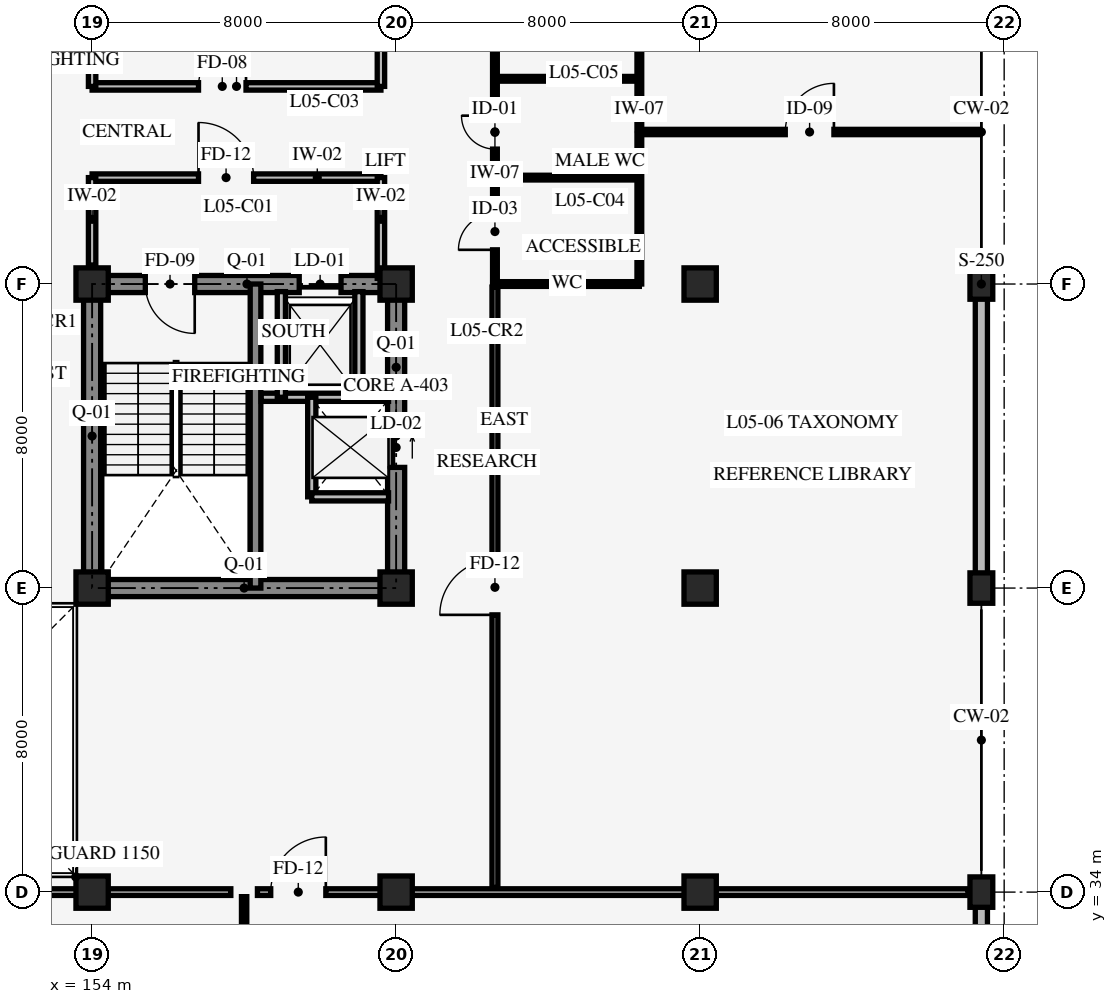
"""IFC4 building model, lengths in metres.
Left out: names, types, materials, properties, quantities, classifications, styles, units other than length and angle.
Written with IfcOpenShell. Run it as: python <this file> out.ifc"""

import sys

from ifc_helpers import new_model, si_unit, direction, frame, frame_2d, origin, origin_2d, place, context, subcontext, project, spatial, rectangle, extrude, element, fill, save


model = new_model("IFC4")
c1 = context("Model", 3, precision=1e-05, world=origin(), true_north=direction((0.0, 1.0)))
c2 = subcontext(c1, "Body", "Model", "MODEL_VIEW")
j1 = project(units=[si_unit("LENGTHUNIT", "METRE"), si_unit("PLANEANGLEUNIT", "RADIAN")], contexts=[c1])
p1 = place(None, origin())
s1 = spatial("IfcSite", under=j1, at=p1, CompositionType="ELEMENT")
p2 = place(p1, origin())
s2 = spatial("IfcBuilding", under=s1, at=p2, CompositionType="ELEMENT")
p3 = place(p2, frame((0.0, 0.0, 19.2)))
s3 = spatial("IfcBuildingStorey", under=s2, at=p3, CompositionType="ELEMENT", Elevation=19.2)
p4 = place(p3, frame((154.0, 42.0, 0.0), z_axis=(0.0, 0.0, 1.0), x_axis=(1.0, 0.0, 0.0)))
e1 = element("IfcWall", 1, at=p4, inside=s3, PredefinedType="SHEAR", context=c2, shape_type="SweptSolid", body=[
    extrude(rectangle(XDim=8.0, YDim=0.45, at=frame_2d((4.0, 0.0))), origin(), (0.0, 0.0, 1.0), 3.95),
])
p5 = place(p3, frame((162.0, 42.0, 0.0), z_axis=(0.0, 0.0, 1.0), x_axis=(0.0, 1.0, 0.0)))
e2 = element("IfcWall", 2, at=p5, inside=s3, PredefinedType="SHEAR", context=c2, shape_type="SweptSolid", body=[
    extrude(rectangle(XDim=8.0, YDim=0.45, at=frame_2d((4.0, 0.0))), origin(), (0.0, 0.0, 1.0), 3.95),
])
p6 = place(p5, frame((3.175, 0.0, 0.0)))
e3 = element("IfcOpeningElement", 3, at=p6, cuts=e2, PredefinedType="OPENING", context=c2, shape_type="SweptSolid", body=[
    extrude(rectangle(XDim=1.05, YDim=2.2, at=frame_2d((0.525, 1.1))), frame((0.0, 0.235, 0.0), z_axis=(0.0, -1.0, 0.0), x_axis=(1.0, 0.0, 0.0)), (0.0, 0.0, 1.0), 0.47),
])
p7 = place(p3, frame((162.0, 50.0, 0.0), z_axis=(0.0, 0.0, 1.0), x_axis=(-1.0, 0.0, 0.0)))
e4 = element("IfcWall", 4, at=p7, inside=s3, PredefinedType="SHEAR", context=c2, shape_type="SweptSolid", body=[
    extrude(rectangle(XDim=8.0, YDim=0.45, at=frame_2d((4.0, 0.0))), origin(), (0.0, 0.0, 1.0), 3.95),
])
p8 = place(p7, frame((5.3, 0.0, 0.0)))
e5 = element("IfcOpeningElement", 5, at=p8, cuts=e4, PredefinedType="OPENING", context=c2, shape_type="SweptSolid", body=[
    extrude(rectangle(XDim=1.3, YDim=2.15, at=frame_2d((0.65, 1.075))), frame((0.0, 0.235, 0.0), z_axis=(0.0, -1.0, 0.0), x_axis=(1.0, 0.0, 0.0)), (0.0, 0.0, 1.0), 0.47),
])
p9 = place(p7, frame((1.45, 0.0, 0.0)))
e6 = element("IfcOpeningElement", 6, at=p9, cuts=e4, PredefinedType="OPENING", context=c2, shape_type="SweptSolid", body=[
    extrude(rectangle(XDim=1.1, YDim=2.2, at=frame_2d((0.55, 1.1))), frame((0.0, 0.235, 0.0), z_axis=(0.0, -1.0, 0.0), x_axis=(1.0, 0.0, 0.0)), (0.0, 0.0, 1.0), 0.47),
])
p10 = place(p3, frame((154.0, 50.0, 0.0), z_axis=(0.0, 0.0, 1.0), x_axis=(0.0, -1.0, 0.0)))
e7 = element("IfcWall", 7, at=p10, inside=s3, PredefinedType="SHEAR", context=c2, shape_type="SweptSolid", body=[
    extrude(rectangle(XDim=8.0, YDim=0.45, at=frame_2d((4.0, 0.0))), origin(), (0.0, 0.0, 1.0), 3.95),
])
p11 = place(p3, frame((158.3, 42.0, 0.0), z_axis=(0.0, 0.0, 1.0), x_axis=(0.0, 1.0, 0.0)))
e8 = element("IfcWall", 8, at=p11, inside=s3, PredefinedType="SHEAR", context=c2, shape_type="SweptSolid", body=[
    extrude(rectangle(XDim=8.0, YDim=0.28, at=frame_2d((4.0, 0.0))), origin(), (0.0, 0.0, 1.0), 3.95),
])
for number, where, z_axis, x_axis in (
    (9, (154.0, 34.0, 0.0), (0.0, 0.0, 1.0), (1.0, 0.0, 0.0)),
    (10, (154.0, 42.0, 0.0), (0.0, 0.0, 1.0), (1.0, 0.0, 0.0)),
    (11, (154.0, 50.0, 0.0), (0.0, 0.0, 1.0), (1.0, 0.0, 0.0)),
    (12, (162.0, 34.0, 0.0), (0.0, 0.0, 1.0), (1.0, 0.0, 0.0)),
    (13, (162.0, 42.0, 0.0), (0.0, 0.0, 1.0), (1.0, 0.0, 0.0)),
    (14, (162.0, 50.0, 0.0), (0.0, 0.0, 1.0), (1.0, 0.0, 0.0)),
    (15, (170.0, 34.0, 0.0), (0.0, 0.0, 1.0), (1.0, 0.0, 0.0)),
    (16, (170.0, 42.0, 0.0), (0.0, 0.0, 1.0), (1.0, 0.0, 0.0)),
    (17, (170.0, 50.0, 0.0), (0.0, 0.0, 1.0), (1.0, 0.0, 0.0)),
):
    element("IfcColumn", number, at=place(p3, frame(where, z_axis=z_axis, x_axis=x_axis)), inside=s3, PredefinedType="COLUMN", context=c2, shape_type="SweptSolid", body=[
        extrude(rectangle(XDim=0.85, YDim=0.85, at=origin_2d()), origin(), (0.0, 0.0, 1.0), 4.2),
    ])
for number, where, z_axis, x_axis in (
    (18, (177.4, 34.0, 0.0), (0.0, 0.0, 1.0), (1.0, 0.0, 0.0)),
    (19, (177.4, 42.0, 0.0), (0.0, 0.0, 1.0), (1.0, 0.0, 0.0)),
    (20, (177.4, 50.0, 0.0), (0.0, 0.0, 1.0), (1.0, 0.0, 0.0)),
):
    element("IfcColumn", number, at=place(p3, frame(where, z_axis=z_axis, x_axis=x_axis)), inside=s3, PredefinedType="COLUMN", context=c2, shape_type="SweptSolid", body=[
        extrude(rectangle(XDim=0.6, YDim=0.8, at=origin_2d()), origin(), (0.0, 0.0, 1.0), 4.2),
    ])
p12 = place(p3, frame((177.4, 50.0, 0.0), z_axis=(0.0, 0.0, 1.0), x_axis=(0.0, -1.0, 0.0)))
e21 = element("IfcWall", 21, at=p12, inside=s3, PredefinedType="STANDARD", context=c2, shape_type="SweptSolid", body=[
    extrude(rectangle(XDim=8.0, YDim=0.32, at=frame_2d((4.0, 0.0))), origin(), (0.0, 0.0, 1.0), 3.19),
])
p13 = place(p3, frame((177.4, 34.0, 0.0), z_axis=(0.0, 0.0, 1.0), x_axis=(0.0, -1.0, 0.0)))
e22 = element("IfcWall", 22, at=p13, inside=s3, PredefinedType="STANDARD", context=c2, shape_type="SweptSolid", body=[
    extrude(rectangle(XDim=8.0, YDim=0.32, at=frame_2d((4.0, 0.0))), origin(), (0.0, 0.0, 1.0), 3.19),
])
p14 = place(p13, frame((3.0, 0.0, 0.85)))
e23 = element("IfcOpeningElement", 23, at=p14, cuts=e22, PredefinedType="OPENING", context=c2, shape_type="SweptSolid", body=[
    extrude(rectangle(XDim=2.0, YDim=1.5, at=frame_2d((1.0, 0.75))), frame((0.0, 0.17, 0.0), z_axis=(0.0, -1.0, 0.0), x_axis=(1.0, 0.0, 0.0)), (0.0, 0.0, 1.0), 0.34),
])
p15 = place(p3, frame((158.45, 47.02, 0.0), z_axis=(0.0, 0.0, 1.0), x_axis=(1.0, 0.0, 0.0)))
e24 = element("IfcWall", 24, at=p15, inside=s3, PredefinedType="STANDARD", context=c2, shape_type="SweptSolid", body=[
    extrude(rectangle(XDim=3.35, YDim=0.215, at=frame_2d((1.675, 0.0))), origin(), (0.0, 0.0, 1.0), 3.9),
])
for number, where, z_axis, x_axis in (
    (25, (158.98, 47.02, 0.0), (0.0, 0.0, 1.0), (0.0, 1.0, 0.0)),
    (26, (161.02, 47.02, 0.0), (0.0, 0.0, 1.0), (0.0, 1.0, 0.0)),
):
    element("IfcWall", number, at=place(p3, frame(where, z_axis=z_axis, x_axis=x_axis)), inside=s3, PredefinedType="STANDARD", context=c2, shape_type="SweptSolid", body=[
        extrude(rectangle(XDim=2.78, YDim=0.215, at=frame_2d((1.39, 0.0))), origin(), (0.0, 0.0, 1.0), 3.9),
    ])
p16 = place(p3, frame((159.78, 44.4, 0.0), z_axis=(0.0, 0.0, 1.0), x_axis=(0.0, 1.0, 0.0)))
e27 = element("IfcWall", 27, at=p16, inside=s3, PredefinedType="STANDARD", context=c2, shape_type="SweptSolid", body=[
    extrude(rectangle(XDim=2.62, YDim=0.215, at=frame_2d((1.31, 0.0))), origin(), (0.0, 0.0, 1.0), 3.9),
])
p17 = place(p3, frame((159.78, 44.4, 0.0), z_axis=(0.0, 0.0, 1.0), x_axis=(1.0, 0.0, 0.0)))
e28 = element("IfcWall", 28, at=p17, inside=s3, PredefinedType="STANDARD", context=c2, shape_type="SweptSolid", body=[
    extrude(rectangle(XDim=2.02, YDim=0.215, at=frame_2d((1.01, 0.0))), origin(), (0.0, 0.0, 1.0), 3.9),
])
p18 = place(p3, frame((154.0, 52.8, 0.0), z_axis=(0.0, 0.0, 1.0), x_axis=(1.0, 0.0, 0.0)))
e29 = element("IfcWall", 29, at=p18, inside=s3, PredefinedType="STANDARD", context=c2, shape_type="SweptSolid", body=[
    extrude(rectangle(XDim=7.6, YDim=0.195, at=frame_2d((3.8, 0.0))), origin(), (0.0, 0.0, 1.0), 3.9),
])
p19 = place(p18, frame((2.8, 0.0, 0.0)))
e30 = element("IfcOpeningElement", 30, at=p19, cuts=e29, PredefinedType="OPENING", context=c2, shape_type="SweptSolid", body=[
    extrude(rectangle(XDim=1.45, YDim=2.2, at=frame_2d((0.725, 1.1))), frame((0.0, 0.107, 0.0), z_axis=(0.0, -1.0, 0.0), x_axis=(1.0, 0.0, 0.0)), (0.0, 0.0, 1.0), 0.215),
])
p20 = place(p3, frame((161.6, 50.15, 0.0), z_axis=(0.0, 0.0, 1.0), x_axis=(0.0, 1.0, 0.0)))
e31 = element("IfcWall", 31, at=p20, inside=s3, PredefinedType="STANDARD", context=c2, shape_type="SweptSolid", body=[
    extrude(rectangle(XDim=2.65, YDim=0.195, at=frame_2d((1.325, 0.0))), origin(), (0.0, 0.0, 1.0), 3.19),
])
p21 = place(p3, frame((154.0, 50.5, 0.0), z_axis=(0.0, 0.0, 1.0), x_axis=(0.0, 1.0, 0.0)))
e32 = element("IfcWall", 32, at=p21, inside=s3, PredefinedType="STANDARD", context=c2, shape_type="SweptSolid", body=[
    extrude(rectangle(XDim=2.3, YDim=0.195, at=frame_2d((1.15, 0.0))), origin(), (0.0, 0.0, 1.0), 3.19),
])
p22 = place(p3, frame((154.0, 55.2, 0.0), z_axis=(0.0, 0.0, 1.0), x_axis=(1.0, 0.0, 0.0)))
e33 = element("IfcWall", 33, at=p22, inside=s3, PredefinedType="STANDARD", context=c2, shape_type="SweptSolid", body=[
    extrude(rectangle(XDim=7.6, YDim=0.195, at=frame_2d((3.8, 0.0))), origin(), (0.0, 0.0, 1.0), 3.9),
])
p23 = place(p22, frame((2.8, 0.0, 0.0)))
e34 = element("IfcOpeningElement", 34, at=p23, cuts=e33, PredefinedType="OPENING", context=c2, shape_type="SweptSolid", body=[
    extrude(rectangle(XDim=1.25, YDim=2.15, at=frame_2d((0.625, 1.075))), frame((0.0, 0.107, 0.0), z_axis=(0.0, -1.0, 0.0), x_axis=(1.0, 0.0, 0.0)), (0.0, 0.0, 1.0), 0.215),
])
p24 = place(p3, frame((161.6, 55.2, 0.0), z_axis=(0.0, 0.0, 1.0), x_axis=(0.0, 1.0, 0.0)))
e35 = element("IfcWall", 35, at=p24, inside=s3, PredefinedType="STANDARD", context=c2, shape_type="SweptSolid", body=[
    extrude(rectangle(XDim=2.65, YDim=0.195, at=frame_2d((1.325, 0.0))), origin(), (0.0, 0.0, 1.0), 3.19),
])
p25 = place(p3, frame((154.0, 55.2, 0.0), z_axis=(0.0, 0.0, 1.0), x_axis=(0.0, 1.0, 0.0)))
e36 = element("IfcWall", 36, at=p25, inside=s3, PredefinedType="STANDARD", context=c2, shape_type="SweptSolid", body=[
    extrude(rectangle(XDim=2.3, YDim=0.195, at=frame_2d((1.15, 0.0))), origin(), (0.0, 0.0, 1.0), 3.19),
])
p26 = place(p3, frame((164.6, 50.0, 0.0), z_axis=(0.0, 0.0, 1.0), x_axis=(0.0, 1.0, 0.0)))
e37 = element("IfcWall", 37, at=p26, inside=s3, PredefinedType="STANDARD", context=c2, shape_type="SweptSolid", body=[
    extrude(rectangle(XDim=8.0, YDim=0.125, at=frame_2d((4.0, 0.0))), origin(), (0.0, 0.0, 1.0), 3.9),
])
p27 = place(p26, frame((0.9, 0.0, 0.0)))
e38 = element("IfcOpeningElement", 38, at=p27, cuts=e37, PredefinedType="OPENING", context=c2, shape_type="SweptSolid", body=[
    extrude(rectangle(XDim=0.96, YDim=2.08, at=frame_2d((0.48, 1.04))), frame((0.0, 0.073, 0.0), z_axis=(0.0, -1.0, 0.0), x_axis=(1.0, 0.0, 0.0)), (0.0, 0.0, 1.0), 0.145),
])
p28 = place(p26, frame((3.55, 0.0, 0.0)))
e39 = element("IfcOpeningElement", 39, at=p28, cuts=e37, PredefinedType="OPENING", context=c2, shape_type="SweptSolid", body=[
    extrude(rectangle(XDim=0.88, YDim=2.05, at=frame_2d((0.44, 1.025))), frame((0.0, 0.073, 0.0), z_axis=(0.0, -1.0, 0.0), x_axis=(1.0, 0.0, 0.0)), (0.0, 0.0, 1.0), 0.145),
])
p29 = place(p26, frame((6.15, 0.0, 0.0)))
e40 = element("IfcOpeningElement", 40, at=p29, cuts=e37, PredefinedType="OPENING", context=c2, shape_type="SweptSolid", body=[
    extrude(rectangle(XDim=0.92, YDim=2.05, at=frame_2d((0.46, 1.025))), frame((0.0, 0.073, 0.0), z_axis=(0.0, -1.0, 0.0), x_axis=(1.0, 0.0, 0.0)), (0.0, 0.0, 1.0), 0.145),
])
p30 = place(p3, frame((168.4, 50.0, 0.0), z_axis=(0.0, 0.0, 1.0), x_axis=(0.0, 1.0, 0.0)))
e41 = element("IfcWall", 41, at=p30, inside=s3, PredefinedType="STANDARD", context=c2, shape_type="SweptSolid", body=[
    extrude(rectangle(XDim=8.0, YDim=0.125, at=frame_2d((4.0, 0.0))), origin(), (0.0, 0.0, 1.0), 3.9),
])
p31 = place(p3, frame((164.6, 50.0, 0.0), z_axis=(0.0, 0.0, 1.0), x_axis=(1.0, 0.0, 0.0)))
e42 = element("IfcWall", 42, at=p31, inside=s3, PredefinedType="STANDARD", context=c2, shape_type="SweptSolid", body=[
    extrude(rectangle(XDim=3.8, YDim=0.125, at=frame_2d((1.9, 0.0))), origin(), (0.0, 0.0, 1.0), 3.14),
])
for number, where, z_axis, x_axis in (
    (43, (164.6, 52.8, 0.0), (0.0, 0.0, 1.0), (1.0, 0.0, 0.0)),
    (44, (164.6, 55.4, 0.0), (0.0, 0.0, 1.0), (1.0, 0.0, 0.0)),
):
    element("IfcWall", number, at=place(p3, frame(where, z_axis=z_axis, x_axis=x_axis)), inside=s3, PredefinedType="STANDARD", context=c2, shape_type="SweptSolid", body=[
        extrude(rectangle(XDim=3.8, YDim=0.125, at=frame_2d((1.9, 0.0))), origin(), (0.0, 0.0, 1.0), 3.9),
    ])
p32 = place(p3, frame((164.6, 34.12, 0.0), z_axis=(0.0, 0.0, 1.0), x_axis=(0.0, 1.0, 0.0)))
e45 = element("IfcWall", 45, at=p32, inside=s3, PredefinedType="STANDARD", context=c2, shape_type="SweptSolid", body=[
    extrude(rectangle(XDim=15.8, YDim=0.155, at=frame_2d((7.9, 0.0))), origin(), (0.0, 0.0, 1.0), 3.9),
])
p33 = place(p32, frame((7.175, 0.0, 0.0)))
e46 = element("IfcOpeningElement", 46, at=p33, cuts=e45, PredefinedType="OPENING", context=c2, shape_type="SweptSolid", body=[
    extrude(rectangle(XDim=1.45, YDim=2.2, at=frame_2d((0.725, 1.1))), frame((0.0, 0.087, 0.0), z_axis=(0.0, -1.0, 0.0), x_axis=(1.0, 0.0, 0.0)), (0.0, 0.0, 1.0), 0.175),
])
p34 = place(p3, frame((168.4, 54.0, 0.0), z_axis=(0.0, 0.0, 1.0), x_axis=(1.0, 0.0, 0.0)))
e47 = element("IfcWall", 47, at=p34, inside=s3, PredefinedType="STANDARD", context=c2, shape_type="SweptSolid", body=[
    extrude(rectangle(XDim=8.96, YDim=0.14, at=frame_2d((4.48, 0.0))), origin(), (0.0, 0.0, 1.0), 3.9),
])
p35 = place(p34, frame((3.84, 0.0, 0.0)))
e48 = element("IfcOpeningElement", 48, at=p35, cuts=e47, PredefinedType="OPENING", context=c2, shape_type="SweptSolid", body=[
    extrude(rectangle(XDim=1.28, YDim=2.14, at=frame_2d((0.64, 1.07))), frame((0.0, 0.08, 0.0), z_axis=(0.0, -1.0, 0.0), x_axis=(1.0, 0.0, 0.0)), (0.0, 0.0, 1.0), 0.16),
])
p36 = place(p3, frame((138.35, 34.0, 0.0), z_axis=(0.0, 0.0, 1.0), x_axis=(1.0, 0.0, 0.0)))
e49 = element("IfcWall", 49, at=p36, inside=s3, PredefinedType="STANDARD", context=c2, shape_type="SweptSolid", body=[
    extrude(rectangle(XDim=19.3, YDim=0.175, at=frame_2d((9.65, 0.0))), origin(), (0.0, 0.0, 1.0), 3.14),
])
p37 = place(p36, frame((3.3, 0.0, 0.0)))
e50 = element("IfcOpeningElement", 50, at=p37, cuts=e49, PredefinedType="OPENING", context=c2, shape_type="SweptSolid", body=[
    extrude(rectangle(XDim=1.4, YDim=2.2, at=frame_2d((0.7, 1.1))), frame((0.0, 0.098, 0.0), z_axis=(0.0, -1.0, 0.0), x_axis=(1.0, 0.0, 0.0)), (0.0, 0.0, 1.0), 0.195),
])
p38 = place(p3, frame((158.0, 26.05, 0.0), z_axis=(0.0, 0.0, 1.0), x_axis=(0.0, 1.0, 0.0)))
e51 = element("IfcWall", 51, at=p38, inside=s3, PredefinedType="STANDARD", context=c2, shape_type="SweptSolid", body=[
    extrude(rectangle(XDim=7.83, YDim=0.14, at=frame_2d((3.915, 0.0))), origin(), (0.0, 0.0, 1.0), 3.39),
])
p39 = place(p38, frame((3.0, 0.0, 0.0)))
e52 = element("IfcOpeningElement", 52, at=p39, cuts=e51, PredefinedType="OPENING", context=c2, shape_type="SweptSolid", body=[
    extrude(rectangle(XDim=1.06, YDim=2.12, at=frame_2d((0.53, 1.06))), frame((0.0, 0.08, 0.0), z_axis=(0.0, -1.0, 0.0), x_axis=(1.0, 0.0, 0.0)), (0.0, 0.0, 1.0), 0.16),
])
p40 = place(p3, frame((158.35, 34.0, 0.0), z_axis=(0.0, 0.0, 1.0), x_axis=(1.0, 0.0, 0.0)))
e53 = element("IfcWall", 53, at=p40, inside=s3, PredefinedType="STANDARD", context=c2, shape_type="SweptSolid", body=[
    extrude(rectangle(XDim=18.7, YDim=0.175, at=frame_2d((9.35, 0.0))), origin(), (0.0, 0.0, 1.0), 3.14),
])
p41 = place(p40, frame((0.35, 0.0, 0.0)))
e54 = element("IfcOpeningElement", 54, at=p41, cuts=e53, PredefinedType="OPENING", context=c2, shape_type="SweptSolid", body=[
    extrude(rectangle(XDim=1.45, YDim=2.2, at=frame_2d((0.725, 1.1))), frame((0.0, 0.098, 0.0), z_axis=(0.0, -1.0, 0.0), x_axis=(1.0, 0.0, 0.0)), (0.0, 0.0, 1.0), 0.195),
])
p42 = place(p8, origin())
e55 = element("IfcDoor", 55, at=p42, inside=s3, OperationType="SINGLE_SWING_LEFT", PredefinedType="DOOR", context=c2, shape_type="SweptSolid", body=[
    extrude(rectangle(XDim=1.3, YDim=2.15, at=frame_2d((0.65, 1.075))), frame((0.0, 0.025, 0.0), z_axis=(0.0, -1.0, 0.0), x_axis=(1.0, 0.0, 0.0)), (0.0, 0.0, 1.0), 0.05),
])
fill(e5, e55)
p43 = place(p9, origin())
e56 = element("IfcDoor", 56, at=p43, inside=s3, OperationType="SLIDING_TO_LEFT", PredefinedType="DOOR", context=c2, shape_type="SweptSolid", body=[
    extrude(rectangle(XDim=1.1, YDim=2.2, at=frame_2d((0.55, 1.1))), frame((0.0, 0.025, 0.0), z_axis=(0.0, -1.0, 0.0), x_axis=(1.0, 0.0, 0.0)), (0.0, 0.0, 1.0), 0.05),
])
fill(e6, e56)
p44 = place(p6, origin())
e57 = element("IfcDoor", 57, at=p44, inside=s3, OperationType="SLIDING_TO_LEFT", PredefinedType="DOOR", context=c2, shape_type="SweptSolid", body=[
    extrude(rectangle(XDim=1.05, YDim=2.2, at=frame_2d((0.525, 1.1))), frame((0.0, 0.025, 0.0), z_axis=(0.0, -1.0, 0.0), x_axis=(1.0, 0.0, 0.0)), (0.0, 0.0, 1.0), 0.05),
])
fill(e3, e57)
p45 = place(p19, origin())
e58 = element("IfcDoor", 58, at=p45, inside=s3, OperationType="SINGLE_SWING_LEFT", PredefinedType="DOOR", context=c2, shape_type="SweptSolid", body=[
    extrude(rectangle(XDim=1.45, YDim=2.2, at=frame_2d((0.725, 1.1))), frame((0.0, 0.025, 0.0), z_axis=(0.0, -1.0, 0.0), x_axis=(1.0, 0.0, 0.0)), (0.0, 0.0, 1.0), 0.05),
])
fill(e30, e58)
p46 = place(p23, origin())
e59 = element("IfcDoor", 59, at=p46, inside=s3, OperationType="SINGLE_SWING_RIGHT", PredefinedType="DOOR", context=c2, shape_type="SweptSolid", body=[
    extrude(rectangle(XDim=1.25, YDim=2.15, at=frame_2d((0.625, 1.075))), frame((0.0, 0.025, 0.0), z_axis=(0.0, -1.0, 0.0), x_axis=(1.0, 0.0, 0.0)), (0.0, 0.0, 1.0), 0.05),
])
fill(e34, e59)
p47 = place(p27, origin())
e60 = element("IfcDoor", 60, at=p47, inside=s3, OperationType="SINGLE_SWING_LEFT", PredefinedType="DOOR", context=c2, shape_type="SweptSolid", body=[
    extrude(rectangle(XDim=0.96, YDim=2.08, at=frame_2d((0.48, 1.04))), frame((0.0, 0.025, 0.0), z_axis=(0.0, -1.0, 0.0), x_axis=(1.0, 0.0, 0.0)), (0.0, 0.0, 1.0), 0.05),
])
fill(e38, e60)
p48 = place(p28, origin())
e61 = element("IfcDoor", 61, at=p48, inside=s3, OperationType="SINGLE_SWING_RIGHT", PredefinedType="DOOR", context=c2, shape_type="SweptSolid", body=[
    extrude(rectangle(XDim=0.88, YDim=2.05, at=frame_2d((0.44, 1.025))), frame((0.0, 0.025, 0.0), z_axis=(0.0, -1.0, 0.0), x_axis=(1.0, 0.0, 0.0)), (0.0, 0.0, 1.0), 0.05),
])
fill(e39, e61)
p49 = place(p33, origin())
e62 = element("IfcDoor", 62, at=p49, inside=s3, OperationType="SINGLE_SWING_LEFT", PredefinedType="DOOR", context=c2, shape_type="SweptSolid", body=[
    extrude(rectangle(XDim=1.45, YDim=2.2, at=frame_2d((0.725, 1.1))), frame((0.0, 0.025, 0.0), z_axis=(0.0, -1.0, 0.0), x_axis=(1.0, 0.0, 0.0)), (0.0, 0.0, 1.0), 0.05),
])
fill(e46, e62)
p50 = place(p35, origin())
e63 = element("IfcDoor", 63, at=p50, inside=s3, OperationType="SINGLE_SWING_RIGHT", PredefinedType="DOOR", context=c2, shape_type="SweptSolid", body=[
    extrude(rectangle(XDim=1.28, YDim=2.14, at=frame_2d((0.64, 1.07))), frame((0.0, 0.025, 0.0), z_axis=(0.0, -1.0, 0.0), x_axis=(1.0, 0.0, 0.0)), (0.0, 0.0, 1.0), 0.05),
])
fill(e48, e63)
p51 = place(p41, origin())
e64 = element("IfcDoor", 64, at=p51, inside=s3, OperationType="SINGLE_SWING_RIGHT", PredefinedType="DOOR", context=c2, shape_type="SweptSolid", body=[
    extrude(rectangle(XDim=1.45, YDim=2.2, at=frame_2d((0.725, 1.1))), frame((0.0, 0.025, 0.0), z_axis=(0.0, -1.0, 0.0), x_axis=(1.0, 0.0, 0.0)), (0.0, 0.0, 1.0), 0.05),
])
fill(e54, e64)
save(model, sys.argv[1])
